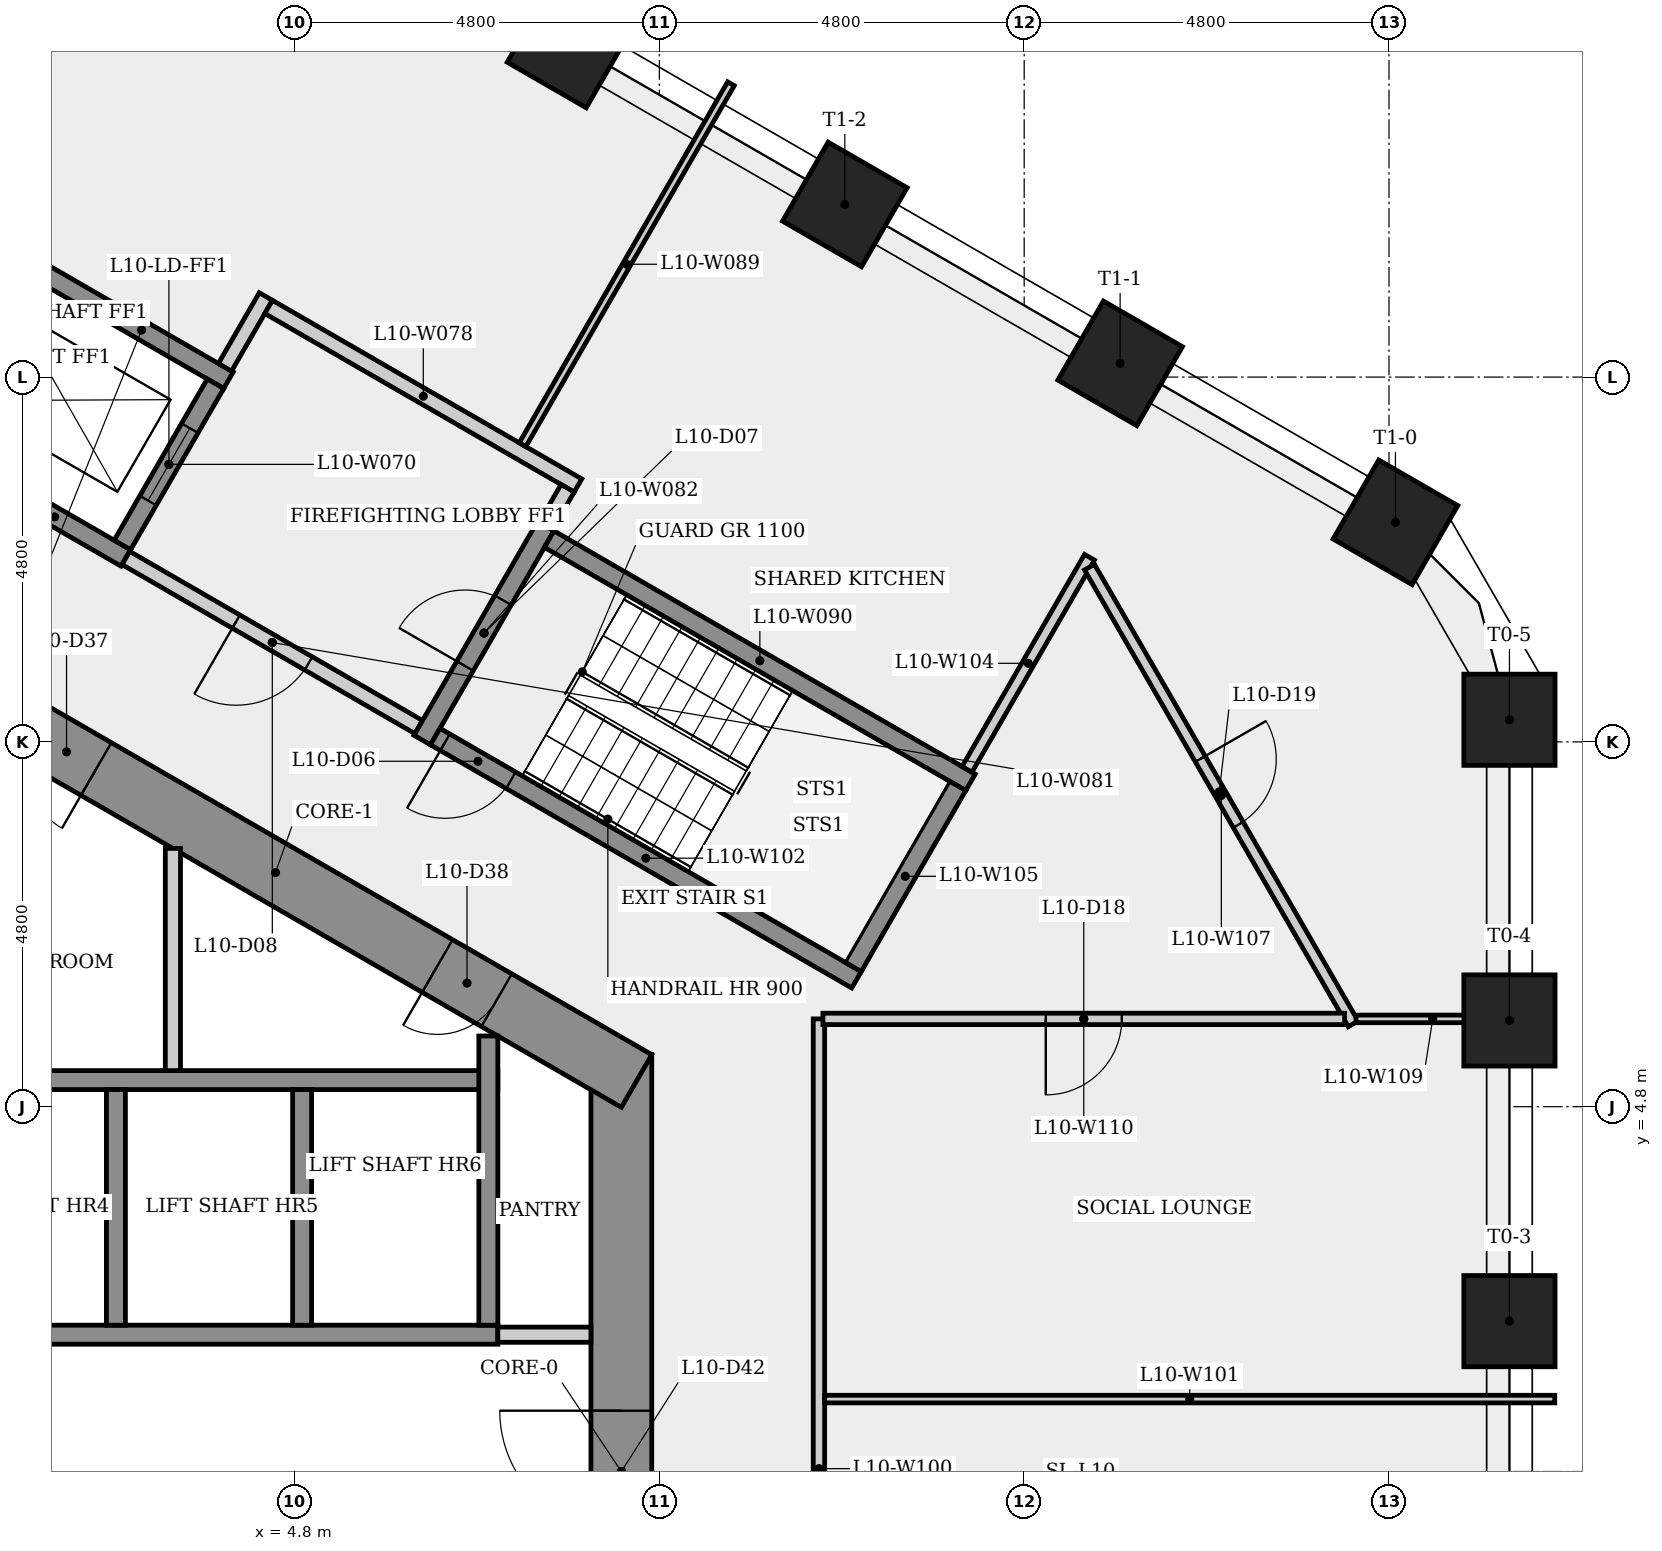
"""IFC4 building model, lengths in metres.
Left out: names, types, materials, properties, quantities, classifications, styles, units other than length and angle.
Written with IfcOpenShell. Run it as: python <this file> out.ifc"""

import sys

from ifc_helpers import new_model, si_unit, direction, frame, frame_2d, origin, origin_2d, place, context, subcontext, project, spatial, rectangle, extrude, element, fill, save


model = new_model("IFC4")
c1 = context("Model", 3, precision=1e-05, world=origin(), true_north=direction((0.0, 1.0)))
c2 = subcontext(c1, "Body", "Model", "MODEL_VIEW")
j1 = project(units=[si_unit("LENGTHUNIT", "METRE"), si_unit("PLANEANGLEUNIT", "RADIAN")], contexts=[c1])
p1 = place(None, origin())
s1 = spatial("IfcSite", under=j1, at=p1, CompositionType="ELEMENT")
p2 = place(p1, origin())
s2 = spatial("IfcBuilding", under=s1, at=p2, CompositionType="ELEMENT")
p3 = place(p2, frame((0.0, 0.0, 42.5)))
s3 = spatial("IfcBuildingStorey", under=s2, at=p3, CompositionType="ELEMENT", Elevation=42.5)
p4 = place(p3, frame((9.1, -5.485, 0.0), z_axis=(0.0, 0.0, 1.0), x_axis=(0.0, 1.0, 0.0)))
e1 = element("IfcWall", 1, at=p4, inside=s3, PredefinedType="SHEAR", context=c2, shape_type="SweptSolid", body=[
    extrude(rectangle(XDim=10.97, YDim=0.8, at=frame_2d((5.485, 0.0))), origin(), (0.0, 0.0, 1.0), 3.4),
])
p5 = place(p4, frame((4.685, 0.0, 0.0)))
e2 = element("IfcOpeningElement", 2, at=p5, cuts=e1, PredefinedType="OPENING", context=c2, shape_type="SweptSolid", body=[
    extrude(rectangle(XDim=1.6, YDim=2.1, at=frame_2d((0.8, 1.05))), frame((0.0, 0.41, 0.0), z_axis=(0.0, -1.0, 0.0), x_axis=(1.0, 0.0, 0.0)), (0.0, 0.0, 1.0), 0.82),
])
p6 = place(p3, frame((9.3, 5.138, 0.0), z_axis=(0.0, 0.0, 1.0), x_axis=(-0.866023993627, 0.500002442456, 0.0)))
e3 = element("IfcWall", 3, at=p6, inside=s3, PredefinedType="SHEAR", context=c2, shape_type="SweptSolid", body=[
    extrude(rectangle(XDim=10.97, YDim=0.8, at=frame_2d((5.485, 0.0))), origin(), (0.0, 0.0, 1.0), 3.4),
])
p7 = place(p6, frame((8.21, 0.0, 0.0)))
e4 = element("IfcOpeningElement", 4, at=p7, cuts=e3, PredefinedType="OPENING", context=c2, shape_type="SweptSolid", body=[
    extrude(rectangle(XDim=0.9, YDim=2.1, at=frame_2d((0.45, 1.05))), frame((0.0, 0.41, 0.0), z_axis=(0.0, -1.0, 0.0), x_axis=(1.0, 0.0, 0.0)), (0.0, 0.0, 1.0), 0.82),
])
p8 = place(p6, frame((2.126, 0.0, 0.0)))
e5 = element("IfcOpeningElement", 5, at=p8, cuts=e3, PredefinedType="OPENING", context=c2, shape_type="SweptSolid", body=[
    extrude(rectangle(XDim=0.9, YDim=2.1, at=frame_2d((0.45, 1.05))), frame((0.0, 0.41, 0.0), z_axis=(0.0, -1.0, 0.0), x_axis=(1.0, 0.0, 0.0)), (0.0, 0.0, 1.0), 0.82),
])
for number, where, z_axis, x_axis in (
    (6, (20.785, 1.978, 0.0), (0.0, 0.0, 1.0), (1.0, 0.0, 0.0)),
    (7, (20.785, 5.935, 0.0), (0.0, 0.0, 1.0), (1.0, 0.0, 0.0)),
    (8, (20.785, 9.891, 0.0), (0.0, 0.0, 1.0), (1.0, 0.0, 0.0)),
    (9, (19.285, 12.489, 0.0), (0.0, 0.0, 1.0), (0.5, 0.866, 0.0)),
    (10, (15.662, 14.58, 0.0), (0.0, 0.0, 1.0), (0.5, 0.866, 0.0)),
    (11, (12.04, 16.672, 0.0), (0.0, 0.0, 1.0), (0.5, 0.866, 0.0)),
    (12, (8.418, 18.763, 0.0), (0.0, 0.0, 1.0), (0.5, 0.866, 0.0)),
):
    element("IfcColumn", number, at=place(p3, frame(where, z_axis=z_axis, x_axis=x_axis)), inside=s3, PredefinedType="COLUMN", context=c2, shape_type="SweptSolid", body=[
        extrude(rectangle(XDim=1.2, YDim=1.2, at=origin_2d()), origin(), (0.0, 0.0, 1.0), 3.4),
    ])
p9 = place(p3, frame((-7.475, 1.8, 0.0), z_axis=(0.0, 0.0, 1.0), x_axis=(1.0, 0.0, 0.0)))
e13 = element("IfcWall", 13, at=p9, inside=s3, PredefinedType="SHEAR", context=c2, shape_type="SweptSolid", body=[
    extrude(rectangle(XDim=14.95, YDim=0.25, at=frame_2d((7.475, 0.0))), origin(), (0.0, 0.0, 1.0), 3.05),
])
p10 = place(p3, frame((-7.225, 5.15, 0.0), z_axis=(0.0, 0.0, 1.0), x_axis=(1.0, 0.0, 0.0)))
e14 = element("IfcWall", 14, at=p10, inside=s3, PredefinedType="SHEAR", context=c2, shape_type="SweptSolid", body=[
    extrude(rectangle(XDim=14.7, YDim=0.25, at=frame_2d((7.35, 0.0))), origin(), (0.0, 0.0, 1.0), 3.05),
])
p11 = place(p3, frame((1.073, 16.008, 0.0), z_axis=(0.0, 0.0, 1.0), x_axis=(0.866040211805, -0.499974350878, 0.0)))
e15 = element("IfcWall", 15, at=p11, inside=s3, PredefinedType="SHEAR", context=c2, shape_type="SweptSolid", body=[
    extrude(rectangle(XDim=3.3, YDim=0.25, at=frame_2d((1.65, 0.0))), origin(), (0.0, 0.0, 1.0), 3.05),
])
p12 = place(p3, frame((2.45, 5.025, 0.0), z_axis=(0.0, 0.0, 1.0), x_axis=(0.0, -1.0, 0.0)))
e16 = element("IfcWall", 16, at=p12, inside=s3, PredefinedType="SHEAR", context=c2, shape_type="SweptSolid", body=[
    extrude(rectangle(XDim=3.1, YDim=0.25, at=frame_2d((1.55, 0.0))), origin(), (0.0, 0.0, 1.0), 3.4),
])
p13 = place(p3, frame((2.581, 12.02, 0.0), z_axis=(0.0, 0.0, 1.0), x_axis=(-0.86603892542, 0.499976579108, 0.0)))
e17 = element("IfcWall", 17, at=p13, inside=s3, PredefinedType="SHEAR", context=c2, shape_type="SweptSolid", body=[
    extrude(rectangle(XDim=2.162, YDim=0.25, at=frame_2d((1.081, 0.0))), origin(), (0.0, 0.0, 1.0), 3.05),
])
p14 = place(p3, frame((2.535, 12.191, 0.0), z_axis=(0.0, 0.0, 1.0), x_axis=(0.500061746146, 0.865989751695, 0.0)))
e18 = element("IfcWall", 18, at=p14, inside=s3, PredefinedType="SHEAR", context=c2, shape_type="SweptSolid", body=[
    extrude(rectangle(XDim=2.45, YDim=0.25, at=frame_2d((1.225, 0.0))), origin(), (0.0, 0.0, 1.0), 3.4),
])
p15 = place(p14, frame((0.675, 0.0, 0.0)))
e19 = element("IfcOpeningElement", 19, at=p15, cuts=e18, PredefinedType="OPENING", context=c2, shape_type="SweptSolid", body=[
    extrude(rectangle(XDim=1.1, YDim=2.1, at=frame_2d((0.55, 1.05))), frame((0.0, 0.135, 0.0), z_axis=(0.0, -1.0, 0.0), x_axis=(1.0, 0.0, 0.0)), (0.0, 0.0, 1.0), 0.27),
])
p16 = place(p3, frame((3.2, 8.198, 0.0), z_axis=(0.0, 0.0, 1.0), x_axis=(0.0, -1.0, 0.0)))
e20 = element("IfcWall", 20, at=p16, inside=s3, PredefinedType="PARTITIONING", context=c2, shape_type="SweptSolid", body=[
    extrude(rectangle(XDim=2.924, YDim=0.2, at=frame_2d((1.462, 0.0))), origin(), (0.0, 0.0, 1.0), 3.05),
])
p17 = place(p3, frame((3.885, 14.529, 0.0), z_axis=(0.0, 0.0, 1.0), x_axis=(0.499997628298, 0.866026773083, 0.0)))
e21 = element("IfcWall", 21, at=p17, inside=s3, PredefinedType="PARTITIONING", context=c2, shape_type="SweptSolid", body=[
    extrude(rectangle(XDim=1.075, YDim=0.2, at=frame_2d((0.538, 0.0))), origin(), (0.0, 0.0, 1.0), 3.05),
])
p18 = place(p3, frame((4.459, 15.323, 0.0), z_axis=(0.0, 0.0, 1.0), x_axis=(0.866016039709, -0.500016218704, 0.0)))
e22 = element("IfcWall", 22, at=p18, inside=s3, PredefinedType="PARTITIONING", context=c2, shape_type="SweptSolid", body=[
    extrude(rectangle(XDim=4.7, YDim=0.2, at=frame_2d((2.35, 0.0))), origin(), (0.0, 0.0, 1.0), 3.05),
])
p19 = place(p3, frame((4.9, 5.025, 0.0), z_axis=(0.0, 0.0, 1.0), x_axis=(0.0, -1.0, 0.0)))
e23 = element("IfcWall", 23, at=p19, inside=s3, PredefinedType="SHEAR", context=c2, shape_type="SweptSolid", body=[
    extrude(rectangle(XDim=3.1, YDim=0.25, at=frame_2d((1.55, 0.0))), origin(), (0.0, 0.0, 1.0), 3.4),
])
p20 = place(p3, frame((6.435, 9.795, 0.0), z_axis=(0.0, 0.0, 1.0), x_axis=(-0.866012907634, 0.500021643343, 0.0)))
e24 = element("IfcWall", 24, at=p20, inside=s3, PredefinedType="PARTITIONING", context=c2, shape_type="SweptSolid", body=[
    extrude(rectangle(XDim=4.45, YDim=0.2, at=frame_2d((2.225, 0.0))), origin(), (0.0, 0.0, 1.0), 3.05),
])
p21 = place(p20, frame((1.675, 0.0, 0.0)))
e25 = element("IfcOpeningElement", 25, at=p21, cuts=e24, PredefinedType="OPENING", context=c2, shape_type="SweptSolid", body=[
    extrude(rectangle(XDim=1.1, YDim=2.1, at=frame_2d((0.55, 1.05))), frame((0.0, 0.11, 0.0), z_axis=(0.0, -1.0, 0.0), x_axis=(1.0, 0.0, 0.0)), (0.0, 0.0, 1.0), 0.22),
])
p22 = place(p3, frame((6.48, 9.624, 0.0), z_axis=(0.0, 0.0, 1.0), x_axis=(0.500017246033, 0.866015446554, 0.0)))
e26 = element("IfcWall", 26, at=p22, inside=s3, PredefinedType="SHEAR", context=c2, shape_type="SweptSolid", body=[
    extrude(rectangle(XDim=3.25, YDim=0.25, at=frame_2d((1.625, 0.0))), origin(), (0.0, 0.0, 1.0), 3.05),
])
p23 = place(p22, frame((1.125, 0.0, 0.0)))
e27 = element("IfcOpeningElement", 27, at=p23, cuts=e26, PredefinedType="OPENING", context=c2, shape_type="SweptSolid", body=[
    extrude(rectangle(XDim=1.0, YDim=2.1, at=frame_2d((0.5, 1.05))), frame((0.0, 0.135, 0.0), z_axis=(0.0, -1.0, 0.0), x_axis=(1.0, 0.0, 0.0)), (0.0, 0.0, 1.0), 0.27),
])
p24 = place(p3, frame((7.475, 1.8, 0.0), z_axis=(0.0, 0.0, 1.0), x_axis=(1.0, 0.0, 0.0)))
e28 = element("IfcWall", 28, at=p24, inside=s3, PredefinedType="PARTITIONING", context=c2, shape_type="SweptSolid", body=[
    extrude(rectangle(XDim=1.225, YDim=0.2, at=frame_2d((0.613, 0.0))), origin(), (0.0, 0.0, 1.0), 3.05),
])
p25 = place(p3, frame((7.35, 5.73, 0.0), z_axis=(0.0, 0.0, 1.0), x_axis=(0.0, -1.0, 0.0)))
e29 = element("IfcWall", 29, at=p25, inside=s3, PredefinedType="SHEAR", context=c2, shape_type="SweptSolid", body=[
    extrude(rectangle(XDim=3.805, YDim=0.25, at=frame_2d((1.903, 0.0))), origin(), (0.0, 0.0, 1.0), 3.05),
])
p26 = place(p3, frame((7.8, 13.51, 0.0), z_axis=(0.0, 0.0, 1.0), x_axis=(0.499993496201, 0.866029158722, 0.0)))
e30 = element("IfcWall", 30, at=p26, inside=s3, PredefinedType="PARTITIONING", context=c2, shape_type="SweptSolid", body=[
    extrude(rectangle(XDim=5.484, YDim=0.1, at=frame_2d((2.742, 0.0))), origin(), (0.0, 0.0, 1.0), 3.05),
])
p27 = place(p3, frame((8.151, 12.268, 0.0), z_axis=(0.0, 0.0, 1.0), x_axis=(0.866025499775, -0.499999833739, 0.0)))
e31 = element("IfcWall", 31, at=p27, inside=s3, PredefinedType="SHEAR", context=c2, shape_type="SweptSolid", body=[
    extrude(rectangle(XDim=6.4, YDim=0.25, at=frame_2d((3.2, 0.0))), origin(), (0.0, 0.0, 1.0), 3.05),
])
p28 = place(p3, frame((8.393, 12.937, 0.0), z_axis=(0.0, 0.0, 1.0), x_axis=(-0.500065409566, -0.86598763626, 0.0)))
e32 = element("IfcWall", 32, at=p28, inside=s3, PredefinedType="PARTITIONING", context=c2, shape_type="SweptSolid", body=[
    extrude(rectangle(XDim=0.575, YDim=0.2, at=frame_2d((0.288, 0.0))), origin(), (0.0, 0.0, 1.0), 3.05),
])
p29 = place(p3, frame((11.7, -5.88, 0.0), z_axis=(0.0, 0.0, 1.0), x_axis=(0.0, 1.0, 0.0)))
e33 = element("IfcWall", 33, at=p29, inside=s3, PredefinedType="PARTITIONING", context=c2, shape_type="SweptSolid", body=[
    extrude(rectangle(XDim=11.835, YDim=0.15, at=frame_2d((5.918, 0.0))), origin(), (0.0, 0.0, 1.0), 3.05),
])
p30 = place(p29, frame((2.902, 0.0, 0.0)))
e34 = element("IfcOpeningElement", 34, at=p30, cuts=e33, PredefinedType="OPENING", context=c2, shape_type="SweptSolid", body=[
    extrude(rectangle(XDim=1.0, YDim=2.1, at=frame_2d((0.5, 1.05))), frame((0.0, 0.085, 0.0), z_axis=(0.0, -1.0, 0.0), x_axis=(1.0, 0.0, 0.0)), (0.0, 0.0, 1.0), 0.17),
])
p31 = place(p3, frame((11.775, 0.953, 0.0), z_axis=(0.0, 0.0, 1.0), x_axis=(1.0, 0.0, 0.0)))
e35 = element("IfcWall", 35, at=p31, inside=s3, PredefinedType="PARTITIONING", context=c2, shape_type="SweptSolid", body=[
    extrude(rectangle(XDim=9.606, YDim=0.1, at=frame_2d((4.803, 0.0))), origin(), (0.0, 0.0, 1.0), 3.05),
])
p32 = place(p3, frame((12.194, 6.47, 0.0), z_axis=(0.0, 0.0, 1.0), x_axis=(-0.866025499775, 0.499999833739, 0.0)))
e36 = element("IfcWall", 36, at=p32, inside=s3, PredefinedType="SHEAR", context=c2, shape_type="SweptSolid", body=[
    extrude(rectangle(XDim=6.4, YDim=0.25, at=frame_2d((3.2, 0.0))), origin(), (0.0, 0.0, 1.0), 3.05),
])
p33 = place(p32, frame((5.25, 0.0, 0.0)))
e37 = element("IfcOpeningElement", 37, at=p33, cuts=e36, PredefinedType="OPENING", context=c2, shape_type="SweptSolid", body=[
    extrude(rectangle(XDim=1.0, YDim=2.1, at=frame_2d((0.5, 1.05))), frame((0.0, 0.135, 0.0), z_axis=(0.0, -1.0, 0.0), x_axis=(1.0, 0.0, 0.0)), (0.0, 0.0, 1.0), 0.27),
])
p34 = place(p3, frame((13.648, 9.239, 0.0), z_axis=(0.0, 0.0, 1.0), x_axis=(0.500017561474, 0.866015264425, 0.0)))
e38 = element("IfcWall", 38, at=p34, inside=s3, PredefinedType="PARTITIONING", context=c2, shape_type="SweptSolid", body=[
    extrude(rectangle(XDim=3.223, YDim=0.15, at=frame_2d((1.611, 0.0))), origin(), (0.0, 0.0, 1.0), 3.05),
])
p35 = place(p3, frame((13.523, 9.022, 0.0), z_axis=(0.0, 0.0, 1.0), x_axis=(-0.500034990121, -0.866005201286, 0.0)))
e39 = element("IfcWall", 39, at=p35, inside=s3, PredefinedType="SHEAR", context=c2, shape_type="SweptSolid", body=[
    extrude(rectangle(XDim=2.75, YDim=0.25, at=frame_2d((1.375, 0.0))), origin(), (0.0, 0.0, 1.0), 3.05),
])
p36 = place(p3, frame((15.259, 11.9, 0.0), z_axis=(0.0, 0.0, 1.0), x_axis=(0.499987416453, -0.866032668777, 0.0)))
e40 = element("IfcWall", 40, at=p36, inside=s3, PredefinedType="PARTITIONING", context=c2, shape_type="SweptSolid", body=[
    extrude(rectangle(XDim=6.939, YDim=0.15, at=frame_2d((3.47, 0.0))), origin(), (0.0, 0.0, 1.0), 3.05),
])
p37 = place(p36, frame((2.915, 0.0, 0.0)))
e41 = element("IfcOpeningElement", 41, at=p37, cuts=e40, PredefinedType="OPENING", context=c2, shape_type="SweptSolid", body=[
    extrude(rectangle(XDim=1.0, YDim=2.1, at=frame_2d((0.5, 1.05))), frame((0.0, 0.085, 0.0), z_axis=(0.0, -1.0, 0.0), x_axis=(1.0, 0.0, 0.0)), (0.0, 0.0, 1.0), 0.17),
])
p38 = place(p3, frame((18.766, 5.955, 0.0), z_axis=(0.0, 0.0, 1.0), x_axis=(1.0, 0.0, 0.0)))
e42 = element("IfcWall", 42, at=p38, inside=s3, PredefinedType="PARTITIONING", context=c2, shape_type="SweptSolid", body=[
    extrude(rectangle(XDim=2.019, YDim=0.1, at=frame_2d((1.009, 0.0))), origin(), (0.0, 0.0, 1.0), 3.05),
])
p39 = place(p3, frame((18.616, 5.955, 0.0), z_axis=(0.0, 0.0, 1.0), x_axis=(-1.0, 0.0, 0.0)))
e43 = element("IfcWall", 43, at=p39, inside=s3, PredefinedType="PARTITIONING", context=c2, shape_type="SweptSolid", body=[
    extrude(rectangle(XDim=6.864, YDim=0.15, at=frame_2d((3.432, 0.0))), origin(), (0.0, 0.0, 1.0), 3.05),
])
p40 = place(p39, frame((2.932, 0.0, 0.0)))
e44 = element("IfcOpeningElement", 44, at=p40, cuts=e43, PredefinedType="OPENING", context=c2, shape_type="SweptSolid", body=[
    extrude(rectangle(XDim=1.0, YDim=2.1, at=frame_2d((0.5, 1.05))), frame((0.0, 0.085, 0.0), z_axis=(0.0, -1.0, 0.0), x_axis=(1.0, 0.0, 0.0)), (0.0, 0.0, 1.0), 0.17),
])
p41 = place(p33, origin())
e45 = element("IfcDoor", 45, at=p41, inside=s3, OperationType="SINGLE_SWING_RIGHT", PredefinedType="DOOR", context=c2, shape_type="SweptSolid", body=[
    extrude(rectangle(XDim=1.0, YDim=2.1, at=frame_2d((0.5, 1.05))), frame((0.0, 0.025, 0.0), z_axis=(0.0, -1.0, 0.0), x_axis=(1.0, 0.0, 0.0)), (0.0, 0.0, 1.0), 0.05),
])
fill(e37, e45)
p42 = place(p23, origin())
e46 = element("IfcDoor", 46, at=p42, inside=s3, OperationType="SINGLE_SWING_LEFT", PredefinedType="DOOR", context=c2, shape_type="SweptSolid", body=[
    extrude(rectangle(XDim=1.0, YDim=2.1, at=frame_2d((0.5, 1.05))), frame((0.0, 0.025, 0.0), z_axis=(0.0, -1.0, 0.0), x_axis=(1.0, 0.0, 0.0)), (0.0, 0.0, 1.0), 0.05),
])
fill(e27, e46)
p43 = place(p21, origin())
e47 = element("IfcDoor", 47, at=p43, inside=s3, OperationType="SINGLE_SWING_RIGHT", PredefinedType="DOOR", context=c2, shape_type="SweptSolid", body=[
    extrude(rectangle(XDim=1.1, YDim=2.1, at=frame_2d((0.55, 1.05))), frame((0.0, 0.025, 0.0), z_axis=(0.0, -1.0, 0.0), x_axis=(1.0, 0.0, 0.0)), (0.0, 0.0, 1.0), 0.05),
])
fill(e25, e47)
p44 = place(p15, origin())
e48 = element("IfcDoor", 48, at=p44, inside=s3, OperationType="SLIDING_TO_LEFT", PredefinedType="DOOR", context=c2, shape_type="SweptSolid", body=[
    extrude(rectangle(XDim=1.1, YDim=2.1, at=frame_2d((0.55, 1.05))), frame((0.0, 0.025, 0.0), z_axis=(0.0, -1.0, 0.0), x_axis=(1.0, 0.0, 0.0)), (0.0, 0.0, 1.0), 0.05),
])
fill(e19, e48)
p45 = place(p40, origin())
e49 = element("IfcDoor", 49, at=p45, inside=s3, OperationType="SINGLE_SWING_RIGHT", PredefinedType="DOOR", context=c2, shape_type="SweptSolid", body=[
    extrude(rectangle(XDim=1.0, YDim=2.1, at=frame_2d((0.5, 1.05))), frame((0.0, 0.025, 0.0), z_axis=(0.0, -1.0, 0.0), x_axis=(1.0, 0.0, 0.0)), (0.0, 0.0, 1.0), 0.05),
])
fill(e44, e49)
p46 = place(p37, origin())
e50 = element("IfcDoor", 50, at=p46, inside=s3, OperationType="SINGLE_SWING_LEFT", PredefinedType="DOOR", context=c2, shape_type="SweptSolid", body=[
    extrude(rectangle(XDim=1.0, YDim=2.1, at=frame_2d((0.5, 1.05))), frame((0.0, 0.025, 0.0), z_axis=(0.0, -1.0, 0.0), x_axis=(1.0, 0.0, 0.0)), (0.0, 0.0, 1.0), 0.05),
])
fill(e41, e50)
p47 = place(p7, origin())
e51 = element("IfcDoor", 51, at=p47, inside=s3, OperationType="SINGLE_SWING_LEFT", PredefinedType="DOOR", context=c2, shape_type="SweptSolid", body=[
    extrude(rectangle(XDim=0.9, YDim=2.1, at=frame_2d((0.45, 1.05))), frame((0.0, 0.025, 0.0), z_axis=(0.0, -1.0, 0.0), x_axis=(1.0, 0.0, 0.0)), (0.0, 0.0, 1.0), 0.05),
])
fill(e4, e51)
p48 = place(p8, origin())
e52 = element("IfcDoor", 52, at=p48, inside=s3, OperationType="SINGLE_SWING_RIGHT", PredefinedType="DOOR", context=c2, shape_type="SweptSolid", body=[
    extrude(rectangle(XDim=0.9, YDim=2.1, at=frame_2d((0.45, 1.05))), frame((0.0, 0.025, 0.0), z_axis=(0.0, -1.0, 0.0), x_axis=(1.0, 0.0, 0.0)), (0.0, 0.0, 1.0), 0.05),
])
fill(e5, e52)
p49 = place(p5, origin())
e53 = element("IfcDoor", 53, at=p49, inside=s3, OperationType="SINGLE_SWING_RIGHT", PredefinedType="DOOR", context=c2, shape_type="SweptSolid", body=[
    extrude(rectangle(XDim=1.6, YDim=2.1, at=frame_2d((0.8, 1.05))), frame((0.0, 0.025, 0.0), z_axis=(0.0, -1.0, 0.0), x_axis=(1.0, 0.0, 0.0)), (0.0, 0.0, 1.0), 0.05),
])
fill(e2, e53)
save(model, sys.argv[1])
